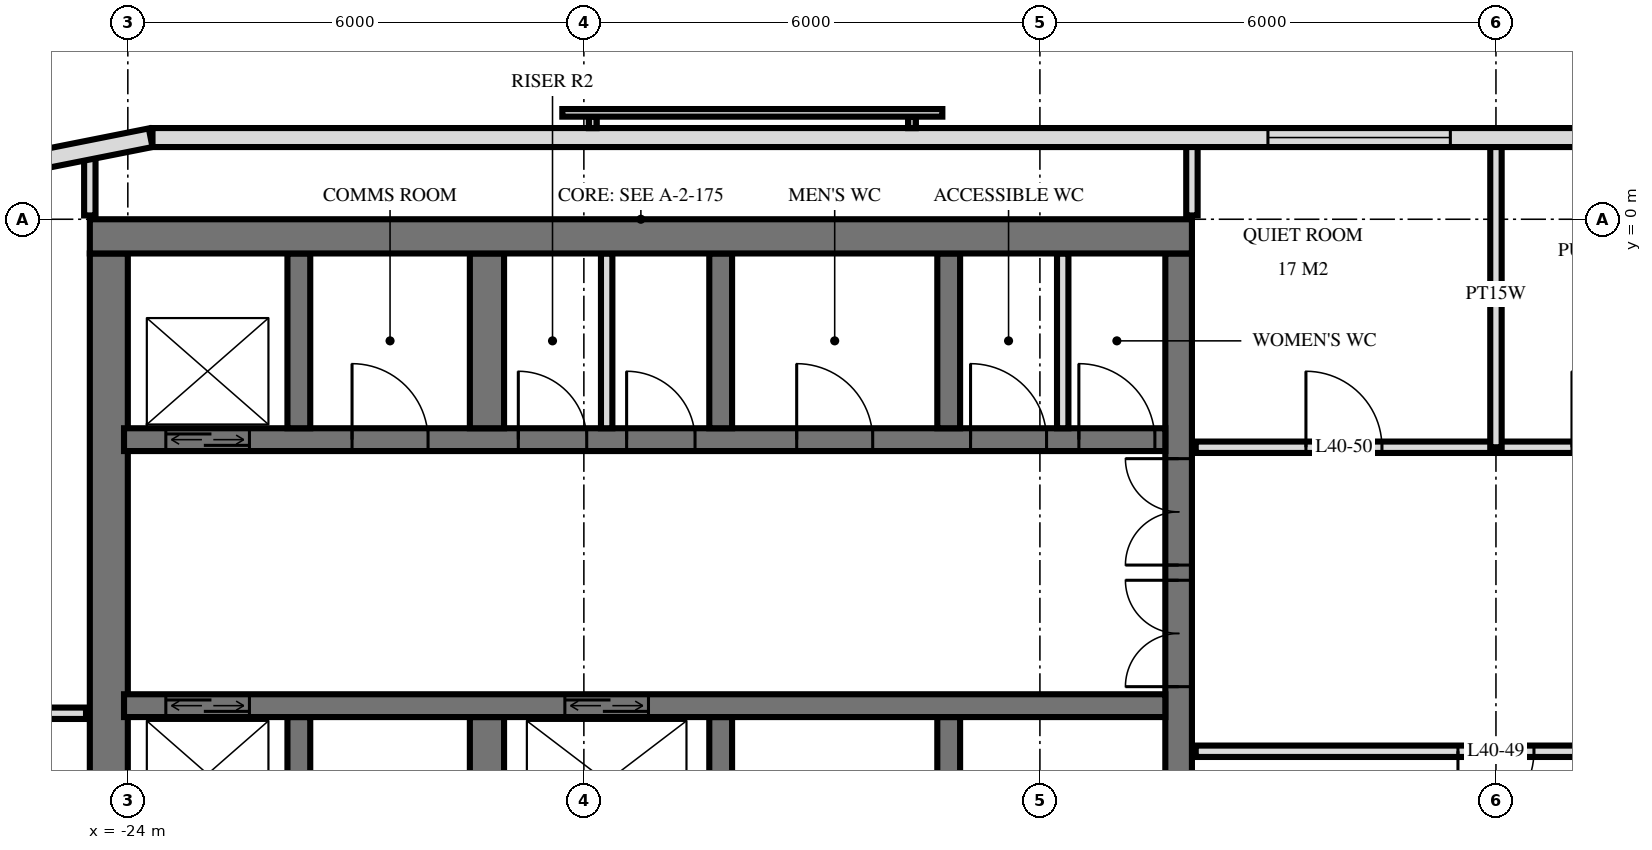
"""IFC4 building model, lengths in metres.
Left out: names, types, materials, properties, quantities, classifications, styles, units other than length and angle.
Written with IfcOpenShell. Run it as: python <this file> out.ifc"""

import sys

from ifc_helpers import new_model, si_unit, direction, frame, frame_2d, origin, place, context, subcontext, project, spatial, rectangle, extrude, element, fill, save


model = new_model("IFC4")
c1 = context("Model", 3, precision=1e-05, world=origin(), true_north=direction((0.0, 1.0)))
c2 = subcontext(c1, "Body", "Model", "MODEL_VIEW")
j1 = project(units=[si_unit("LENGTHUNIT", "METRE"), si_unit("PLANEANGLEUNIT", "RADIAN")], contexts=[c1])
p1 = place(None, origin())
s1 = spatial("IfcSite", under=j1, at=p1, CompositionType="ELEMENT")
p2 = place(p1, origin())
s2 = spatial("IfcBuilding", under=s1, at=p2, CompositionType="ELEMENT")
p3 = place(p2, frame((0.0, 0.0, 156.0)))
s3 = spatial("IfcBuildingStorey", under=s2, at=p3, CompositionType="ELEMENT", Elevation=156.0)
p4 = place(p3, frame((-24.5, -0.225, 0.0), z_axis=(0.0, 0.0, 1.0), x_axis=(1.0, 0.0, 0.0)))
e1 = element("IfcWall", 1, at=p4, inside=s3, PredefinedType="SHEAR", context=c2, shape_type="SweptSolid", body=[
    extrude(rectangle(XDim=14.5, YDim=0.45, at=frame_2d((7.25, 0.0))), origin(), (0.0, 0.0, 1.0), 3.6),
])
p5 = place(p3, frame((-10.175, -14.55, 0.0), z_axis=(0.0, 0.0, 1.0), x_axis=(0.0, 1.0, 0.0)))
e2 = element("IfcWall", 2, at=p5, inside=s3, PredefinedType="SHEAR", context=c2, shape_type="SweptSolid", body=[
    extrude(rectangle(XDim=14.1, YDim=0.35, at=frame_2d((7.05, 0.0))), origin(), (0.0, 0.0, 1.0), 3.6),
])
p6 = place(p5, frame((8.4, 0.0, 0.0)))
e3 = element("IfcOpeningElement", 3, at=p6, cuts=e2, PredefinedType="OPENING", context=c2, shape_type="SweptSolid", body=[
    extrude(rectangle(XDim=1.4, YDim=2.4, at=frame_2d((0.7, 1.2))), frame((0.0, 0.185, 0.0), z_axis=(0.0, -1.0, 0.0), x_axis=(1.0, 0.0, 0.0)), (0.0, 0.0, 1.0), 0.37),
])
p7 = place(p5, frame((10.0, 0.0, 0.0)))
e4 = element("IfcOpeningElement", 4, at=p7, cuts=e2, PredefinedType="OPENING", context=c2, shape_type="SweptSolid", body=[
    extrude(rectangle(XDim=1.4, YDim=2.4, at=frame_2d((0.7, 1.2))), frame((0.0, 0.185, 0.0), z_axis=(0.0, -1.0, 0.0), x_axis=(1.0, 0.0, 0.0)), (0.0, 0.0, 1.0), 0.37),
])
p8 = place(p5, frame((4.0, 0.0, 0.0)))
e5 = element("IfcOpeningElement", 5, at=p8, cuts=e2, PredefinedType="OPENING", context=c2, shape_type="SweptSolid", body=[
    extrude(rectangle(XDim=1.2, YDim=2.1, at=frame_2d((0.6, 1.05))), frame((0.0, 0.185, 0.0), z_axis=(0.0, -1.0, 0.0), x_axis=(1.0, 0.0, 0.0)), (0.0, 0.0, 1.0), 0.37),
])
p9 = place(p3, frame((-24.25, -14.55, 0.0), z_axis=(0.0, 0.0, 1.0), x_axis=(0.0, 1.0, 0.0)))
e6 = element("IfcWall", 6, at=p9, inside=s3, PredefinedType="SHEAR", context=c2, shape_type="SweptSolid", body=[
    extrude(rectangle(XDim=14.1, YDim=0.5, at=frame_2d((7.05, 0.0))), origin(), (0.0, 0.0, 1.0), 3.6),
])
p10 = place(p3, frame((-24.05, -2.9, 0.0), z_axis=(0.0, 0.0, 1.0), x_axis=(1.0, 0.0, 0.0)))
e7 = element("IfcWall", 7, at=p10, inside=s3, PredefinedType="SHEAR", context=c2, shape_type="SweptSolid", body=[
    extrude(rectangle(XDim=13.7, YDim=0.3, at=frame_2d((6.85, 0.0))), origin(), (0.0, 0.0, 1.0), 3.6),
])
p11 = place(p10, frame((0.55, 0.0, 0.0)))
e8 = element("IfcOpeningElement", 8, at=p11, cuts=e7, PredefinedType="OPENING", context=c2, shape_type="SweptSolid", body=[
    extrude(rectangle(XDim=1.1, YDim=2.1, at=frame_2d((0.55, 1.05))), frame((0.0, 0.16, 0.0), z_axis=(0.0, -1.0, 0.0), x_axis=(1.0, 0.0, 0.0)), (0.0, 0.0, 1.0), 0.32),
])
p12 = place(p10, frame((6.613, 0.0, 0.0)))
e9 = element("IfcOpeningElement", 9, at=p12, cuts=e7, PredefinedType="OPENING", context=c2, shape_type="SweptSolid", body=[
    extrude(rectangle(XDim=0.9, YDim=2.1, at=frame_2d((0.45, 1.05))), frame((0.0, 0.16, 0.0), z_axis=(0.0, -1.0, 0.0), x_axis=(1.0, 0.0, 0.0)), (0.0, 0.0, 1.0), 0.32),
])
p13 = place(p10, frame((5.188, 0.0, 0.0)))
e10 = element("IfcOpeningElement", 10, at=p13, cuts=e7, PredefinedType="OPENING", context=c2, shape_type="SweptSolid", body=[
    extrude(rectangle(XDim=0.9, YDim=2.1, at=frame_2d((0.45, 1.05))), frame((0.0, 0.16, 0.0), z_axis=(0.0, -1.0, 0.0), x_axis=(1.0, 0.0, 0.0)), (0.0, 0.0, 1.0), 0.32),
])
p14 = place(p10, frame((12.562, 0.0, 0.0)))
e11 = element("IfcOpeningElement", 11, at=p14, cuts=e7, PredefinedType="OPENING", context=c2, shape_type="SweptSolid", body=[
    extrude(rectangle(XDim=1.0, YDim=2.1, at=frame_2d((0.5, 1.05))), frame((0.0, 0.16, 0.0), z_axis=(0.0, -1.0, 0.0), x_axis=(1.0, 0.0, 0.0)), (0.0, 0.0, 1.0), 0.32),
])
p15 = place(p10, frame((11.137, 0.0, 0.0)))
e12 = element("IfcOpeningElement", 12, at=p15, cuts=e7, PredefinedType="OPENING", context=c2, shape_type="SweptSolid", body=[
    extrude(rectangle(XDim=1.0, YDim=2.1, at=frame_2d((0.5, 1.05))), frame((0.0, 0.16, 0.0), z_axis=(0.0, -1.0, 0.0), x_axis=(1.0, 0.0, 0.0)), (0.0, 0.0, 1.0), 0.32),
])
p16 = place(p10, frame((8.85, 0.0, 0.0)))
e13 = element("IfcOpeningElement", 13, at=p16, cuts=e7, PredefinedType="OPENING", context=c2, shape_type="SweptSolid", body=[
    extrude(rectangle(XDim=1.0, YDim=2.1, at=frame_2d((0.5, 1.05))), frame((0.0, 0.16, 0.0), z_axis=(0.0, -1.0, 0.0), x_axis=(1.0, 0.0, 0.0)), (0.0, 0.0, 1.0), 0.32),
])
p17 = place(p10, frame((3.0, 0.0, 0.0)))
e14 = element("IfcOpeningElement", 14, at=p17, cuts=e7, PredefinedType="OPENING", context=c2, shape_type="SweptSolid", body=[
    extrude(rectangle(XDim=1.0, YDim=2.1, at=frame_2d((0.5, 1.05))), frame((0.0, 0.16, 0.0), z_axis=(0.0, -1.0, 0.0), x_axis=(1.0, 0.0, 0.0)), (0.0, 0.0, 1.0), 0.32),
])
p18 = place(p3, frame((-24.05, -6.4, 0.0), z_axis=(0.0, 0.0, 1.0), x_axis=(1.0, 0.0, 0.0)))
e15 = element("IfcWall", 15, at=p18, inside=s3, PredefinedType="SHEAR", context=c2, shape_type="SweptSolid", body=[
    extrude(rectangle(XDim=13.7, YDim=0.3, at=frame_2d((6.85, 0.0))), origin(), (0.0, 0.0, 1.0), 3.6),
])
p19 = place(p18, frame((0.55, 0.0, 0.0)))
e16 = element("IfcOpeningElement", 16, at=p19, cuts=e15, PredefinedType="OPENING", context=c2, shape_type="SweptSolid", body=[
    extrude(rectangle(XDim=1.1, YDim=2.1, at=frame_2d((0.55, 1.05))), frame((0.0, 0.16, 0.0), z_axis=(0.0, -1.0, 0.0), x_axis=(1.0, 0.0, 0.0)), (0.0, 0.0, 1.0), 0.32),
])
p20 = place(p18, frame((5.8, 0.0, 0.0)))
e17 = element("IfcOpeningElement", 17, at=p20, cuts=e15, PredefinedType="OPENING", context=c2, shape_type="SweptSolid", body=[
    extrude(rectangle(XDim=1.1, YDim=2.1, at=frame_2d((0.55, 1.05))), frame((0.0, 0.16, 0.0), z_axis=(0.0, -1.0, 0.0), x_axis=(1.0, 0.0, 0.0)), (0.0, 0.0, 1.0), 0.32),
])
for number, where, z_axis, x_axis in (
    (18, (-13.2, -2.75, 0.0), (0.0, 0.0, 1.0), (0.0, 1.0, 0.0)),
    (19, (-13.2, -8.85, 0.0), (0.0, 0.0, 1.0), (0.0, 1.0, 0.0)),
    (20, (-16.2, -2.75, 0.0), (0.0, 0.0, 1.0), (0.0, 1.0, 0.0)),
    (21, (-16.2, -8.85, 0.0), (0.0, 0.0, 1.0), (0.0, 1.0, 0.0)),
):
    element("IfcWall", number, at=place(p3, frame(where, z_axis=z_axis, x_axis=x_axis)), inside=s3, PredefinedType="SHEAR", context=c2, shape_type="SweptSolid", body=[
        extrude(rectangle(XDim=2.3, YDim=0.3, at=frame_2d((1.15, 0.0))), origin(), (0.0, 0.0, 1.0), 3.6),
    ])
for number, where, z_axis, x_axis in (
    (22, (-19.275, -2.75, 0.0), (0.0, 0.0, 1.0), (0.0, 1.0, 0.0)),
    (23, (-19.275, -8.85, 0.0), (0.0, 0.0, 1.0), (0.0, 1.0, 0.0)),
):
    element("IfcWall", number, at=place(p3, frame(where, z_axis=z_axis, x_axis=x_axis)), inside=s3, PredefinedType="SHEAR", context=c2, shape_type="SweptSolid", body=[
        extrude(rectangle(XDim=2.3, YDim=0.45, at=frame_2d((1.15, 0.0))), origin(), (0.0, 0.0, 1.0), 3.6),
    ])
for number, where, z_axis, x_axis in (
    (24, (-21.75, -2.75, 0.0), (0.0, 0.0, 1.0), (0.0, 1.0, 0.0)),
    (25, (-21.75, -8.85, 0.0), (0.0, 0.0, 1.0), (0.0, 1.0, 0.0)),
):
    element("IfcWall", number, at=place(p3, frame(where, z_axis=z_axis, x_axis=x_axis)), inside=s3, PredefinedType="SHEAR", context=c2, shape_type="SweptSolid", body=[
        extrude(rectangle(XDim=2.3, YDim=0.3, at=frame_2d((1.15, 0.0))), origin(), (0.0, 0.0, 1.0), 3.6),
    ])
p21 = place(p3, frame((23.675, 1.075, 0.0), z_axis=(0.0, 0.0, 1.0), x_axis=(-1.0, 0.0, 0.0)))
e26 = element("IfcWall", 26, at=p21, inside=s3, PredefinedType="SOLIDWALL", context=c2, shape_type="SweptSolid", body=[
    extrude(rectangle(XDim=47.351, YDim=0.25, at=frame_2d((23.675, 0.0))), origin(), (0.0, 0.0, 1.0), 3.32),
])
p22 = place(p21, frame((15.275, 0.0, 0.3)))
e27 = element("IfcOpeningElement", 27, at=p22, cuts=e26, PredefinedType="OPENING", context=c2, shape_type="SweptSolid", body=[
    extrude(rectangle(XDim=2.4, YDim=2.1, at=frame_2d((1.2, 1.05))), frame((0.0, 0.135, 0.0), z_axis=(0.0, -1.0, 0.0), x_axis=(1.0, 0.0, 0.0)), (0.0, 0.0, 1.0), 0.27),
])
p23 = place(p21, frame((18.275, 0.0, 0.3)))
e28 = element("IfcOpeningElement", 28, at=p23, cuts=e26, PredefinedType="OPENING", context=c2, shape_type="SweptSolid", body=[
    extrude(rectangle(XDim=2.4, YDim=2.1, at=frame_2d((1.2, 1.05))), frame((0.0, 0.135, 0.0), z_axis=(0.0, -1.0, 0.0), x_axis=(1.0, 0.0, 0.0)), (0.0, 0.0, 1.0), 0.27),
])
p24 = place(p21, frame((21.275, 0.0, 0.3)))
e29 = element("IfcOpeningElement", 29, at=p24, cuts=e26, PredefinedType="OPENING", context=c2, shape_type="SweptSolid", body=[
    extrude(rectangle(XDim=2.4, YDim=2.1, at=frame_2d((1.2, 1.05))), frame((0.0, 0.135, 0.0), z_axis=(0.0, -1.0, 0.0), x_axis=(1.0, 0.0, 0.0)), (0.0, 0.0, 1.0), 0.27),
])
p25 = place(p21, frame((30.275, 0.0, 0.3)))
e30 = element("IfcOpeningElement", 30, at=p25, cuts=e26, PredefinedType="OPENING", context=c2, shape_type="SweptSolid", body=[
    extrude(rectangle(XDim=2.4, YDim=2.1, at=frame_2d((1.2, 1.05))), frame((0.0, 0.135, 0.0), z_axis=(0.0, -1.0, 0.0), x_axis=(1.0, 0.0, 0.0)), (0.0, 0.0, 1.0), 0.27),
])
p26 = place(p3, frame((-23.7, 1.073, 0.0), z_axis=(0.0, 0.0, 1.0), x_axis=(-0.980803419081, -0.194999110559, 0.0)))
e31 = element("IfcWall", 31, at=p26, inside=s3, PredefinedType="SOLIDWALL", context=c2, shape_type="SweptSolid", body=[
    extrude(rectangle(XDim=1.681, YDim=0.25, at=frame_2d((0.841, 0.0))), origin(), (0.0, 0.0, 1.0), 3.32),
])
for number, where, z_axis, x_axis in (
    (32, (-17.7, -2.75, 0.0), (0.0, 0.0, 1.0), (0.0, 1.0, 0.0)),
    (33, (-11.7, -2.75, 0.0), (0.0, 0.0, 1.0), (0.0, 1.0, 0.0)),
):
    element("IfcWall", number, at=place(p3, frame(where, z_axis=z_axis, x_axis=x_axis)), inside=s3, PredefinedType="PARTITIONING", context=c2, shape_type="SweptSolid", body=[
        extrude(rectangle(XDim=2.3, YDim=0.15, at=frame_2d((1.15, 0.0))), origin(), (0.0, 0.0, 1.0), 3.3),
    ])
p27 = place(p3, frame((-6.0, -3.0, 0.0), z_axis=(0.0, 0.0, 1.0), x_axis=(0.0, 1.0, 0.0)))
e34 = element("IfcWall", 34, at=p27, inside=s3, PredefinedType="PLUMBINGWALL", context=c2, shape_type="SweptSolid", body=[
    extrude(rectangle(XDim=4.02, YDim=0.15, at=frame_2d((2.01, 0.0))), origin(), (0.0, 0.0, 1.0), 3.32),
])
p28 = place(p3, frame((-10.0, 0.05, 0.0), z_axis=(0.0, 0.0, 1.0), x_axis=(0.0, 1.0, 0.0)))
e35 = element("IfcWall", 35, at=p28, inside=s3, PredefinedType="PARTITIONING", context=c2, shape_type="SweptSolid", body=[
    extrude(rectangle(XDim=0.97, YDim=0.15, at=frame_2d((0.485, 0.0))), origin(), (0.0, 0.0, 1.0), 3.32),
])
p29 = place(p3, frame((-24.5, 0.05, 0.0), z_axis=(0.0, 0.0, 1.0), x_axis=(0.0, 1.0, 0.0)))
e36 = element("IfcWall", 36, at=p29, inside=s3, PredefinedType="PARTITIONING", context=c2, shape_type="SweptSolid", body=[
    extrude(rectangle(XDim=0.807, YDim=0.15, at=frame_2d((0.404, 0.0))), origin(), (0.0, 0.0, 1.0), 3.32),
])
p30 = place(p3, frame((-9.95, -7.0, 0.0), z_axis=(0.0, 0.0, 1.0), x_axis=(1.0, 0.0, 0.0)))
e37 = element("IfcWall", 37, at=p30, inside=s3, PredefinedType="PARTITIONING", context=c2, shape_type="SweptSolid", body=[
    extrude(rectangle(XDim=19.9, YDim=0.15, at=frame_2d((9.95, 0.0))), origin(), (0.0, 0.0, 1.0), 3.32),
])
p31 = place(p30, frame((9.45, 0.0, 0.0)))
e38 = element("IfcOpeningElement", 38, at=p31, cuts=e37, PredefinedType="OPENING", context=c2, shape_type="SweptSolid", body=[
    extrude(rectangle(XDim=1.0, YDim=2.1, at=frame_2d((0.5, 1.05))), frame((0.0, 0.085, 0.0), z_axis=(0.0, -1.0, 0.0), x_axis=(1.0, 0.0, 0.0)), (0.0, 0.0, 1.0), 0.17),
])
p32 = place(p30, frame((3.45, 0.0, 0.0)))
e39 = element("IfcOpeningElement", 39, at=p32, cuts=e37, PredefinedType="OPENING", context=c2, shape_type="SweptSolid", body=[
    extrude(rectangle(XDim=1.0, YDim=2.1, at=frame_2d((0.5, 1.05))), frame((0.0, 0.085, 0.0), z_axis=(0.0, -1.0, 0.0), x_axis=(1.0, 0.0, 0.0)), (0.0, 0.0, 1.0), 0.17),
])
p33 = place(p3, frame((-28.02, -6.5, 0.0), z_axis=(0.0, 0.0, 1.0), x_axis=(1.0, 0.0, 0.0)))
e40 = element("IfcWall", 40, at=p33, inside=s3, PredefinedType="PARTITIONING", context=c2, shape_type="SweptSolid", body=[
    extrude(rectangle(XDim=3.47, YDim=0.15, at=frame_2d((1.735, 0.0))), origin(), (0.0, 0.0, 1.0), 3.32),
])
p34 = place(p33, frame((1.22, 0.0, 0.0)))
e41 = element("IfcOpeningElement", 41, at=p34, cuts=e40, PredefinedType="OPENING", context=c2, shape_type="SweptSolid", body=[
    extrude(rectangle(XDim=0.9, YDim=2.1, at=frame_2d((0.45, 1.05))), frame((0.0, 0.085, 0.0), z_axis=(0.0, -1.0, 0.0), x_axis=(1.0, 0.0, 0.0)), (0.0, 0.0, 1.0), 0.17),
])
p35 = place(p3, frame((-9.95, -3.0, 0.0), z_axis=(0.0, 0.0, 1.0), x_axis=(1.0, 0.0, 0.0)))
e42 = element("IfcWall", 42, at=p35, inside=s3, PredefinedType="PARTITIONING", context=c2, shape_type="SweptSolid", body=[
    extrude(rectangle(XDim=19.9, YDim=0.15, at=frame_2d((9.95, 0.0))), origin(), (0.0, 0.0, 1.0), 3.32),
])
p36 = place(p35, frame((1.45, 0.0, 0.0)))
e43 = element("IfcOpeningElement", 43, at=p36, cuts=e42, PredefinedType="OPENING", context=c2, shape_type="SweptSolid", body=[
    extrude(rectangle(XDim=1.0, YDim=2.1, at=frame_2d((0.5, 1.05))), frame((0.0, 0.085, 0.0), z_axis=(0.0, -1.0, 0.0), x_axis=(1.0, 0.0, 0.0)), (0.0, 0.0, 1.0), 0.17),
])
p37 = place(p35, frame((4.95, 0.0, 0.0)))
e44 = element("IfcOpeningElement", 44, at=p37, cuts=e42, PredefinedType="OPENING", context=c2, shape_type="SweptSolid", body=[
    extrude(rectangle(XDim=1.0, YDim=2.1, at=frame_2d((0.5, 1.05))), frame((0.0, 0.085, 0.0), z_axis=(0.0, -1.0, 0.0), x_axis=(1.0, 0.0, 0.0)), (0.0, 0.0, 1.0), 0.17),
])
p38 = place(p35, frame((7.7, 0.0, 0.0)))
e45 = element("IfcOpeningElement", 45, at=p38, cuts=e42, PredefinedType="OPENING", context=c2, shape_type="SweptSolid", body=[
    extrude(rectangle(XDim=1.0, YDim=2.1, at=frame_2d((0.5, 1.05))), frame((0.0, 0.085, 0.0), z_axis=(0.0, -1.0, 0.0), x_axis=(1.0, 0.0, 0.0)), (0.0, 0.0, 1.0), 0.17),
])
p39 = place(p35, frame((14.2, 0.0, 0.0)))
e46 = element("IfcOpeningElement", 46, at=p39, cuts=e42, PredefinedType="OPENING", context=c2, shape_type="SweptSolid", body=[
    extrude(rectangle(XDim=1.0, YDim=2.1, at=frame_2d((0.5, 1.05))), frame((0.0, 0.085, 0.0), z_axis=(0.0, -1.0, 0.0), x_axis=(1.0, 0.0, 0.0)), (0.0, 0.0, 1.0), 0.17),
])
p40 = place(p25, origin())
e47 = element("IfcWindow", 47, at=p40, inside=s3, PartitioningType="SINGLE_PANEL", PredefinedType="WINDOW", context=c2, shape_type="SweptSolid", body=[
    extrude(rectangle(XDim=2.4, YDim=2.1, at=frame_2d((1.2, 1.05))), frame((0.0, 0.03, 0.0), z_axis=(0.0, -1.0, 0.0), x_axis=(1.0, 0.0, 0.0)), (0.0, 0.0, 1.0), 0.06),
])
fill(e30, e47)
p41 = place(p11, origin())
e48 = element("IfcDoor", 48, at=p41, inside=s3, OperationType="DOUBLE_DOOR_SLIDING", PredefinedType="USERDEFINED", context=c2, shape_type="SweptSolid", body=[
    extrude(rectangle(XDim=1.1, YDim=2.1, at=frame_2d((0.55, 1.05))), frame((0.0, 0.025, 0.0), z_axis=(0.0, -1.0, 0.0), x_axis=(1.0, 0.0, 0.0)), (0.0, 0.0, 1.0), 0.05),
])
fill(e8, e48)
p42 = place(p19, origin())
e49 = element("IfcDoor", 49, at=p42, inside=s3, OperationType="DOUBLE_DOOR_SLIDING", PredefinedType="USERDEFINED", context=c2, shape_type="SweptSolid", body=[
    extrude(rectangle(XDim=1.1, YDim=2.1, at=frame_2d((0.55, 1.05))), frame((0.0, 0.025, 0.0), z_axis=(0.0, -1.0, 0.0), x_axis=(1.0, 0.0, 0.0)), (0.0, 0.0, 1.0), 0.05),
])
fill(e16, e49)
p43 = place(p20, origin())
e50 = element("IfcDoor", 50, at=p43, inside=s3, OperationType="DOUBLE_DOOR_SLIDING", PredefinedType="USERDEFINED", context=c2, shape_type="SweptSolid", body=[
    extrude(rectangle(XDim=1.1, YDim=2.1, at=frame_2d((0.55, 1.05))), frame((0.0, 0.025, 0.0), z_axis=(0.0, -1.0, 0.0), x_axis=(1.0, 0.0, 0.0)), (0.0, 0.0, 1.0), 0.05),
])
fill(e17, e50)
p44 = place(p6, origin())
e51 = element("IfcDoor", 51, at=p44, inside=s3, OperationType="DOUBLE_DOOR_SINGLE_SWING", PredefinedType="DOOR", context=c2, shape_type="SweptSolid", body=[
    extrude(rectangle(XDim=1.4, YDim=2.4, at=frame_2d((0.7, 1.2))), frame((0.0, 0.025, 0.0), z_axis=(0.0, -1.0, 0.0), x_axis=(1.0, 0.0, 0.0)), (0.0, 0.0, 1.0), 0.05),
])
fill(e3, e51)
p45 = place(p7, origin())
e52 = element("IfcDoor", 52, at=p45, inside=s3, OperationType="DOUBLE_DOOR_SINGLE_SWING", PredefinedType="DOOR", context=c2, shape_type="SweptSolid", body=[
    extrude(rectangle(XDim=1.4, YDim=2.4, at=frame_2d((0.7, 1.2))), frame((0.0, 0.025, 0.0), z_axis=(0.0, -1.0, 0.0), x_axis=(1.0, 0.0, 0.0)), (0.0, 0.0, 1.0), 0.05),
])
fill(e4, e52)
p46 = place(p12, origin())
e53 = element("IfcDoor", 53, at=p46, inside=s3, OperationType="SINGLE_SWING_RIGHT", PredefinedType="DOOR", context=c2, shape_type="SweptSolid", body=[
    extrude(rectangle(XDim=0.9, YDim=2.1, at=frame_2d((0.45, 1.05))), frame((0.0, 0.025, 0.0), z_axis=(0.0, -1.0, 0.0), x_axis=(1.0, 0.0, 0.0)), (0.0, 0.0, 1.0), 0.05),
])
fill(e9, e53)
p47 = place(p13, origin())
e54 = element("IfcDoor", 54, at=p47, inside=s3, OperationType="SINGLE_SWING_RIGHT", PredefinedType="DOOR", context=c2, shape_type="SweptSolid", body=[
    extrude(rectangle(XDim=0.9, YDim=2.1, at=frame_2d((0.45, 1.05))), frame((0.0, 0.025, 0.0), z_axis=(0.0, -1.0, 0.0), x_axis=(1.0, 0.0, 0.0)), (0.0, 0.0, 1.0), 0.05),
])
fill(e10, e54)
p48 = place(p14, origin())
e55 = element("IfcDoor", 55, at=p48, inside=s3, OperationType="SINGLE_SWING_RIGHT", PredefinedType="DOOR", context=c2, shape_type="SweptSolid", body=[
    extrude(rectangle(XDim=1.0, YDim=2.1, at=frame_2d((0.5, 1.05))), frame((0.0, 0.025, 0.0), z_axis=(0.0, -1.0, 0.0), x_axis=(1.0, 0.0, 0.0)), (0.0, 0.0, 1.0), 0.05),
])
fill(e11, e55)
p49 = place(p15, origin())
e56 = element("IfcDoor", 56, at=p49, inside=s3, OperationType="SINGLE_SWING_RIGHT", PredefinedType="DOOR", context=c2, shape_type="SweptSolid", body=[
    extrude(rectangle(XDim=1.0, YDim=2.1, at=frame_2d((0.5, 1.05))), frame((0.0, 0.025, 0.0), z_axis=(0.0, -1.0, 0.0), x_axis=(1.0, 0.0, 0.0)), (0.0, 0.0, 1.0), 0.05),
])
fill(e12, e56)
p50 = place(p16, origin())
e57 = element("IfcDoor", 57, at=p50, inside=s3, OperationType="SINGLE_SWING_RIGHT", PredefinedType="DOOR", context=c2, shape_type="SweptSolid", body=[
    extrude(rectangle(XDim=1.0, YDim=2.1, at=frame_2d((0.5, 1.05))), frame((0.0, 0.025, 0.0), z_axis=(0.0, -1.0, 0.0), x_axis=(1.0, 0.0, 0.0)), (0.0, 0.0, 1.0), 0.05),
])
fill(e13, e57)
p51 = place(p17, origin())
e58 = element("IfcDoor", 58, at=p51, inside=s3, OperationType="SINGLE_SWING_RIGHT", PredefinedType="DOOR", context=c2, shape_type="SweptSolid", body=[
    extrude(rectangle(XDim=1.0, YDim=2.1, at=frame_2d((0.5, 1.05))), frame((0.0, 0.025, 0.0), z_axis=(0.0, -1.0, 0.0), x_axis=(1.0, 0.0, 0.0)), (0.0, 0.0, 1.0), 0.05),
])
fill(e14, e58)
p52 = place(p32, frame((0.5, 0.0, 0.0), z_axis=(0.0, 0.0, 1.0), x_axis=(-1.0, 0.0, 0.0)))
e59 = element("IfcDoor", 59, at=p52, inside=s3, OperationType="SINGLE_SWING_LEFT", PredefinedType="DOOR", context=c2, shape_type="SweptSolid", body=[
    extrude(rectangle(XDim=1.0, YDim=2.1, at=frame_2d((0.0, 1.05))), frame((0.0, -0.025, 0.0), z_axis=(0.0, 1.0, 0.0), x_axis=(-1.0, 0.0, 0.0)), (0.0, 0.0, 1.0), 0.05),
])
fill(e39, e59)
p53 = place(p36, origin())
e60 = element("IfcDoor", 60, at=p53, inside=s3, OperationType="SINGLE_SWING_RIGHT", PredefinedType="DOOR", context=c2, shape_type="SweptSolid", body=[
    extrude(rectangle(XDim=1.0, YDim=2.1, at=frame_2d((0.5, 1.05))), frame((0.0, 0.025, 0.0), z_axis=(0.0, -1.0, 0.0), x_axis=(1.0, 0.0, 0.0)), (0.0, 0.0, 1.0), 0.05),
])
fill(e43, e60)
save(model, sys.argv[1])
